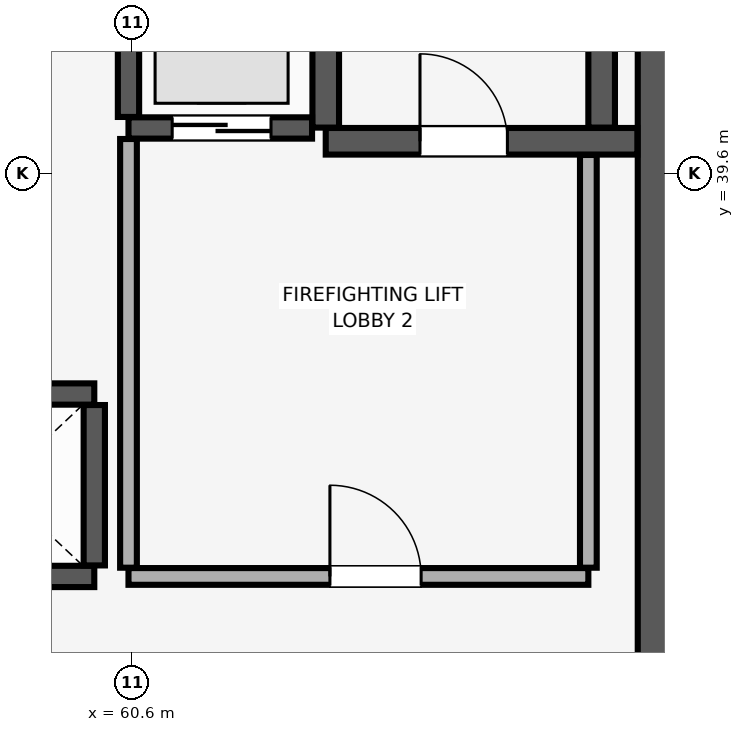
"""IFC4 building model, lengths in metres.
Left out: names, types, materials, properties, quantities, classifications, styles, units other than length and angle.
Written with IfcOpenShell. Run it as: python <this file> out.ifc"""

import sys

from ifc_helpers import new_model, si_unit, direction, frame, frame_2d, origin, place, context, subcontext, project, spatial, rectangle, extrude, element, fill, save


model = new_model("IFC4")
c1 = context("Model", 3, precision=1e-05, world=origin(), true_north=direction((0.0, 1.0)))
c2 = subcontext(c1, "Body", "Model", "MODEL_VIEW")
j1 = project(units=[si_unit("LENGTHUNIT", "METRE"), si_unit("PLANEANGLEUNIT", "RADIAN")], contexts=[c1])
p1 = place(None, origin())
s1 = spatial("IfcSite", under=j1, at=p1, CompositionType="ELEMENT")
p2 = place(p1, origin())
s2 = spatial("IfcBuilding", under=s1, at=p2, CompositionType="ELEMENT")
p3 = place(p2, frame((0.0, 0.0, 76.4)))
s3 = spatial("IfcBuildingStorey", under=s2, at=p3, CompositionType="ELEMENT", Elevation=76.4)
p4 = place(p3, frame((67.8, 29.4, 0.0), z_axis=(0.0, 0.0, 1.0), x_axis=(0.0, 1.0, 0.0)))
e1 = element("IfcWall", 1, at=p4, inside=s3, PredefinedType="SHEAR", context=c2, shape_type="SweptSolid", body=[
    extrude(rectangle(XDim=19.2, YDim=1.1, at=frame_2d((9.6, 0.0))), origin(), (0.0, 0.0, 1.0), 3.4),
])
p5 = place(p3, frame((63.145, 40.025, 0.0), z_axis=(0.0, 0.0, 1.0), x_axis=(1.0, 0.0, 0.0)))
e2 = element("IfcWall", 2, at=p5, inside=s3, PredefinedType="SHEAR", context=c2, shape_type="SweptSolid", body=[
    extrude(rectangle(XDim=4.1, YDim=0.35, at=frame_2d((2.05, 0.0))), origin(), (0.0, 0.0, 1.0), 3.4),
])
p6 = place(p5, frame((1.24, 0.0, 0.0)))
e3 = element("IfcOpeningElement", 3, at=p6, cuts=e2, PredefinedType="OPENING", context=c2, shape_type="SweptSolid", body=[
    extrude(rectangle(XDim=1.15, YDim=2.15, at=frame_2d((0.575, 1.075))), frame((0.0, 0.185, 0.0), z_axis=(0.0, -1.0, 0.0), x_axis=(1.0, 0.0, 0.0)), (0.0, 0.0, 1.0), 0.37),
])
for number, where, z_axis, x_axis in (
    (4, (63.145, 40.205, 0.0), (0.0, 0.0, 1.0), (0.0, 1.0, 0.0)),
    (5, (66.775, 40.205, 0.0), (0.0, 0.0, 1.0), (0.0, 1.0, 0.0)),
):
    element("IfcWall", number, at=place(p3, frame(where, z_axis=z_axis, x_axis=x_axis)), inside=s3, PredefinedType="SHEAR", context=c2, shape_type="SweptSolid", body=[
        extrude(rectangle(XDim=8.09, YDim=0.35, at=frame_2d((4.045, 0.0))), origin(), (0.0, 0.0, 1.0), 3.4),
    ])
for number, where, z_axis, x_axis in (
    (6, (57.55, 34.3, 0.0), (0.0, 0.0, 1.0), (1.0, 0.0, 0.0)),
    (7, (57.55, 36.7, 0.0), (0.0, 0.0, 1.0), (1.0, 0.0, 0.0)),
):
    element("IfcWall", number, at=place(p3, frame(where, z_axis=z_axis, x_axis=x_axis)), inside=s3, PredefinedType="SHEAR", context=c2, shape_type="SweptSolid", body=[
        extrude(rectangle(XDim=2.55, YDim=0.28, at=frame_2d((1.275, 0.0))), origin(), (0.0, 0.0, 1.0), 3.4),
    ])
p7 = place(p3, frame((60.1, 34.445, 0.0), z_axis=(0.0, 0.0, 1.0), x_axis=(0.0, 1.0, 0.0)))
e8 = element("IfcWall", 8, at=p7, inside=s3, PredefinedType="SHEAR", context=c2, shape_type="SweptSolid", body=[
    extrude(rectangle(XDim=2.11, YDim=0.28, at=frame_2d((1.055, 0.0))), origin(), (0.0, 0.0, 1.0), 3.4),
])
p8 = place(p3, frame((60.55, 40.2, 0.0), z_axis=(0.0, 0.0, 1.0), x_axis=(1.0, 0.0, 0.0)))
e9 = element("IfcWall", 9, at=p8, inside=s3, PredefinedType="SHEAR", context=c2, shape_type="SweptSolid", body=[
    extrude(rectangle(XDim=2.415, YDim=0.28, at=frame_2d((1.208, 0.0))), origin(), (0.0, 0.0, 1.0), 3.4),
])
p9 = place(p8, frame((0.575, 0.0, 0.0)))
e10 = element("IfcOpeningElement", 10, at=p9, cuts=e9, PredefinedType="OPENING", context=c2, shape_type="SweptSolid", body=[
    extrude(rectangle(XDim=1.3, YDim=2.3, at=frame_2d((0.65, 1.15))), frame((0.0, 0.15, 0.0), z_axis=(0.0, -1.0, 0.0), x_axis=(1.0, 0.0, 0.0)), (0.0, 0.0, 1.0), 0.3),
])
p10 = place(p3, frame((60.55, 40.345, 0.0), z_axis=(0.0, 0.0, 1.0), x_axis=(0.0, 1.0, 0.0)))
e11 = element("IfcWall", 11, at=p10, inside=s3, PredefinedType="SHEAR", context=c2, shape_type="SweptSolid", body=[
    extrude(rectangle(XDim=2.81, YDim=0.28, at=frame_2d((1.405, 0.0))), origin(), (0.0, 0.0, 1.0), 3.4),
])
p11 = place(p3, frame((60.55, 34.3, 0.0), z_axis=(0.0, 0.0, 1.0), x_axis=(1.0, 0.0, 0.0)))
e12 = element("IfcWall", 12, at=p11, inside=s3, PredefinedType="PARTITIONING", context=c2, shape_type="SweptSolid", body=[
    extrude(rectangle(XDim=6.05, YDim=0.22, at=frame_2d((3.025, 0.0))), origin(), (0.0, 0.0, 1.0), 3.4),
])
p12 = place(p11, frame((2.65, 0.0, 0.0)))
e13 = element("IfcOpeningElement", 13, at=p12, cuts=e12, PredefinedType="OPENING", context=c2, shape_type="SweptSolid", body=[
    extrude(rectangle(XDim=1.2, YDim=2.15, at=frame_2d((0.6, 1.075))), frame((0.0, 0.12, 0.0), z_axis=(0.0, -1.0, 0.0), x_axis=(1.0, 0.0, 0.0)), (0.0, 0.0, 1.0), 0.24),
])
p13 = place(p3, frame((60.55, 34.415, 0.0), z_axis=(0.0, 0.0, 1.0), x_axis=(0.0, 1.0, 0.0)))
e14 = element("IfcWall", 14, at=p13, inside=s3, PredefinedType="PARTITIONING", context=c2, shape_type="SweptSolid", body=[
    extrude(rectangle(XDim=5.64, YDim=0.22, at=frame_2d((2.82, 0.0))), origin(), (0.0, 0.0, 1.0), 3.4),
])
p14 = place(p3, frame((66.6, 34.415, 0.0), z_axis=(0.0, 0.0, 1.0), x_axis=(0.0, 1.0, 0.0)))
e15 = element("IfcWall", 15, at=p14, inside=s3, PredefinedType="PARTITIONING", context=c2, shape_type="SweptSolid", body=[
    extrude(rectangle(XDim=5.43, YDim=0.22, at=frame_2d((2.715, 0.0))), origin(), (0.0, 0.0, 1.0), 3.4),
])
p15 = place(p6, origin())
e16 = element("IfcDoor", 16, at=p15, inside=s3, OperationType="SINGLE_SWING_LEFT", PredefinedType="DOOR", context=c2, shape_type="SweptSolid", body=[
    extrude(rectangle(XDim=1.15, YDim=2.15, at=frame_2d((0.575, 1.075))), frame((0.0, 0.025, 0.0), z_axis=(0.0, -1.0, 0.0), x_axis=(1.0, 0.0, 0.0)), (0.0, 0.0, 1.0), 0.05),
])
fill(e3, e16)
p16 = place(p9, origin())
e17 = element("IfcDoor", 17, at=p16, inside=s3, OperationType="DOUBLE_DOOR_SLIDING", PredefinedType="DOOR", context=c2, shape_type="SweptSolid", body=[
    extrude(rectangle(XDim=1.3, YDim=2.3, at=frame_2d((0.65, 1.15))), frame((0.0, 0.025, 0.0), z_axis=(0.0, -1.0, 0.0), x_axis=(1.0, 0.0, 0.0)), (0.0, 0.0, 1.0), 0.05),
])
fill(e10, e17)
p17 = place(p12, origin())
e18 = element("IfcDoor", 18, at=p17, inside=s3, OperationType="SINGLE_SWING_LEFT", PredefinedType="DOOR", context=c2, shape_type="SweptSolid", body=[
    extrude(rectangle(XDim=1.2, YDim=2.15, at=frame_2d((0.6, 1.075))), frame((0.0, 0.025, 0.0), z_axis=(0.0, -1.0, 0.0), x_axis=(1.0, 0.0, 0.0)), (0.0, 0.0, 1.0), 0.05),
])
fill(e13, e18)
save(model, sys.argv[1])
